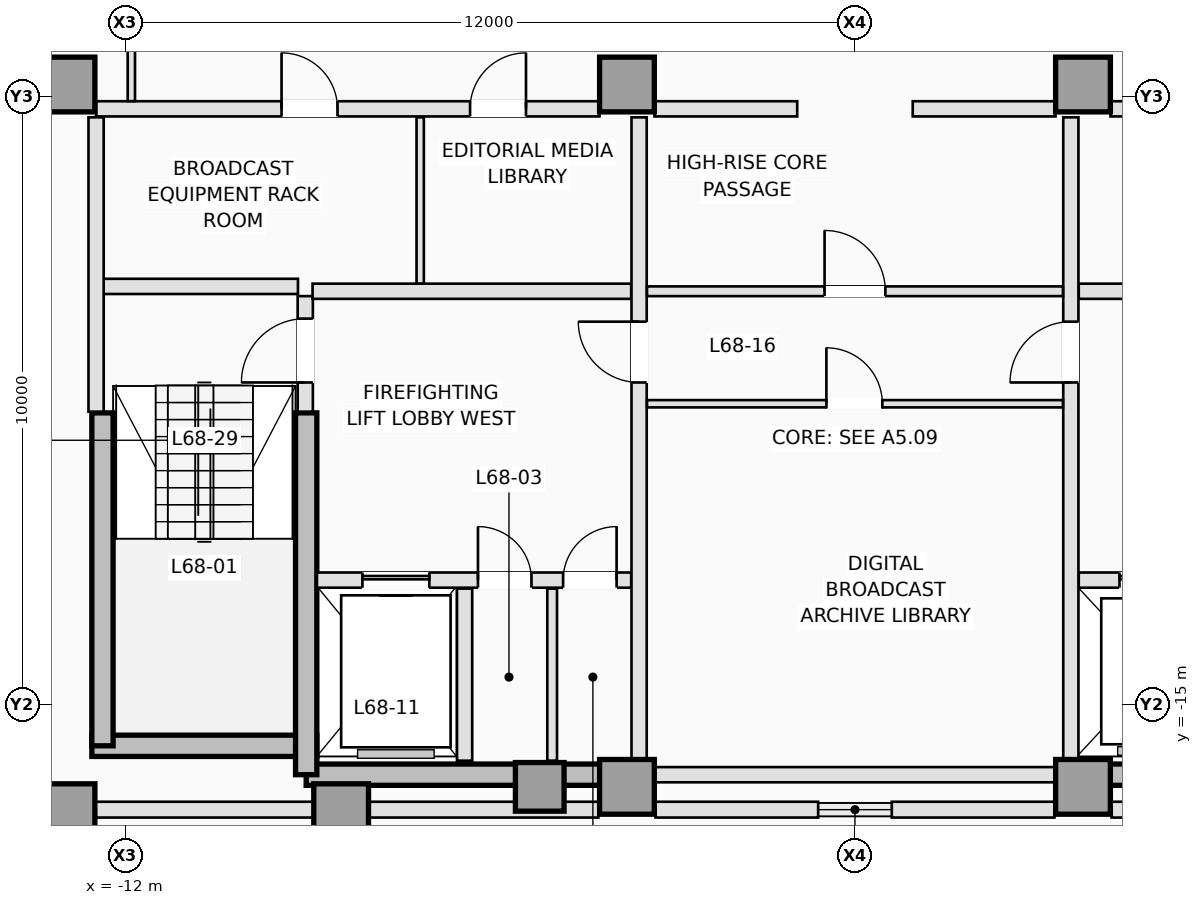
"""IFC4 building model, lengths in metres.
Left out: names, types, materials, properties, quantities, classifications, styles, units other than length and angle.
Written with IfcOpenShell. Run it as: python <this file> out.ifc"""

import sys

from ifc_helpers import new_model, si_unit, direction, frame, frame_2d, origin, origin_2d, place, context, subcontext, project, spatial, rectangle, extrude, element, fill, save


model = new_model("IFC4")
c1 = context("Model", 3, precision=1e-05, world=origin(), true_north=direction((0.0, 1.0)))
c2 = subcontext(c1, "Body", "Model", "MODEL_VIEW")
j1 = project(units=[si_unit("LENGTHUNIT", "METRE"), si_unit("PLANEANGLEUNIT", "RADIAN")], contexts=[c1])
p1 = place(None, origin())
s1 = spatial("IfcSite", under=j1, at=p1, CompositionType="ELEMENT")
p2 = place(p1, origin())
s2 = spatial("IfcBuilding", under=s1, at=p2, CompositionType="ELEMENT")
p3 = place(p2, frame((0.0, 0.0, 246.4)))
s3 = spatial("IfcBuildingStorey", under=s2, at=p3, CompositionType="ELEMENT", Elevation=246.4)
p4 = place(p3, frame((-12.55, -15.675, 0.0), z_axis=(0.0, 0.0, 1.0), x_axis=(1.0, 0.0, 0.0)))
e1 = element("IfcWall", 1, at=p4, inside=s3, PredefinedType="SHEAR", context=c2, shape_type="SweptSolid", body=[
    extrude(rectangle(XDim=3.7, YDim=0.35, at=frame_2d((1.85, 0.0))), origin(), (0.0, 0.0, 1.0), 3.5),
])
for number, where, z_axis, x_axis in (
    (2, (-9.025, -16.15, 0.0), (0.0, 0.0, 1.0), (1.0, 0.0, 0.0)),
    (3, (3.75, -16.15, 0.0), (0.0, 0.0, 1.0), (1.0, 0.0, 0.0)),
):
    element("IfcWall", number, at=place(p3, frame(where, z_axis=z_axis, x_axis=x_axis)), inside=s3, PredefinedType="SHEAR", context=c2, shape_type="SweptSolid", body=[
        extrude(rectangle(XDim=5.275, YDim=0.35, at=frame_2d((2.637, 0.0))), origin(), (0.0, 0.0, 1.0), 3.5),
    ])
p5 = place(p3, frame((-12.375, -15.675, 0.0), z_axis=(0.0, 0.0, 1.0), x_axis=(0.0, 1.0, 0.0)))
e4 = element("IfcWall", 4, at=p5, inside=s3, PredefinedType="SHEAR", context=c2, shape_type="SweptSolid", body=[
    extrude(rectangle(XDim=5.475, YDim=0.35, at=frame_2d((2.738, 0.0))), origin(), (0.0, 0.0, 1.0), 3.5),
])
p6 = place(p3, frame((-9.025, -16.15, 0.0), z_axis=(0.0, 0.0, 1.0), x_axis=(0.0, 1.0, 0.0)))
e5 = element("IfcWall", 5, at=p6, inside=s3, PredefinedType="SHEAR", context=c2, shape_type="SweptSolid", body=[
    extrude(rectangle(XDim=5.95, YDim=0.35, at=frame_2d((2.975, 0.0))), origin(), (0.0, 0.0, 1.0), 3.5),
])
for number, where, z_axis, x_axis in (
    (6, (-12.95, -16.75, 0.0), (0.0, 0.0, 1.0), (1.0, 0.0, 0.0)),
    (7, (-8.45, -16.75, 0.0), (0.0, 0.0, 1.0), (1.0, 0.0, 0.0)),
    (8, (-3.75, -16.35, 0.0), (0.0, 0.0, 1.0), (1.0, 0.0, 0.0)),
    (9, (3.75, -16.35, 0.0), (0.0, 0.0, 1.0), (1.0, 0.0, 0.0)),
    (10, (-12.95, -4.8, 0.0), (0.0, 0.0, 1.0), (1.0, 0.0, 0.0)),
    (11, (-3.75, -4.8, 0.0), (0.0, 0.0, 1.0), (1.0, 0.0, 0.0)),
    (12, (3.75, -4.8, 0.0), (0.0, 0.0, 1.0), (1.0, 0.0, 0.0)),
):
    element("IfcColumn", number, at=place(p3, frame(where, z_axis=z_axis, x_axis=x_axis)), inside=s3, PredefinedType="COLUMN", context=c2, shape_type="SweptSolid", body=[
        extrude(rectangle(XDim=0.9, YDim=0.9, at=origin_2d()), origin(), (0.0, 0.0, 1.0), 3.5),
    ])
p7 = place(p3, frame((-5.184, -16.35, 0.0), z_axis=(0.0, 0.0, 1.0), x_axis=(0.0, 1.0, 0.0)))
e13 = element("IfcColumn", 13, at=p7, inside=s3, PredefinedType="COLUMN", context=c2, shape_type="SweptSolid", body=[
    extrude(rectangle(XDim=0.8, YDim=0.8, at=origin_2d()), origin(), (0.0, 0.0, 1.0), 3.5),
])
for number, where, z_axis, x_axis in (
    (14, (15.493, -16.725, 0.0), (0.0, 0.0, 1.0), (-1.0, 0.0, 0.0)),
    (15, (-4.22, -16.725, 0.0), (0.0, 0.0, 1.0), (-1.0, 0.0, 0.0)),
):
    element("IfcWall", number, at=place(p3, frame(where, z_axis=z_axis, x_axis=x_axis)), inside=s3, PredefinedType="STANDARD", context=c2, shape_type="SweptSolid", body=[
        extrude(rectangle(XDim=11.273, YDim=0.26, at=frame_2d((5.636, 0.0))), origin(), (0.0, 0.0, 1.0), 2.79),
    ])
for number, where, z_axis, x_axis in (
    (16, (3.28, -16.725, 0.0), (0.0, 0.0, 1.0), (-1.0, 0.0, 0.0)),
    (17, (-0.606, -16.725, 0.0), (0.0, 0.0, 1.0), (-1.0, 0.0, 0.0)),
):
    element("IfcWall", number, at=place(p3, frame(where, z_axis=z_axis, x_axis=x_axis)), inside=s3, PredefinedType="STANDARD", context=c2, shape_type="SweptSolid", body=[
        extrude(rectangle(XDim=2.674, YDim=0.26, at=frame_2d((1.337, 0.0))), origin(), (0.0, 0.0, 1.0), 3.25),
    ])
p8 = place(p3, frame((-9.04, -10.18, 0.0), z_axis=(0.0, 0.0, 1.0), x_axis=(0.0, 1.0, 0.0)))
e18 = element("IfcWall", 18, at=p8, inside=s3, PredefinedType="PARTITIONING", context=c2, shape_type="SweptSolid", body=[
    extrude(rectangle(XDim=1.9, YDim=0.25, at=frame_2d((0.95, 0.0))), origin(), (0.0, 0.0, 1.0), 3.25),
])
p9 = place(p8, frame((0.48, 0.0, 0.0)))
e19 = element("IfcOpeningElement", 19, at=p9, cuts=e18, PredefinedType="OPENING", context=c2, shape_type="SweptSolid", body=[
    extrude(rectangle(XDim=1.05, YDim=2.15, at=frame_2d((0.525, 1.075))), frame((0.0, 0.135, 0.0), z_axis=(0.0, -1.0, 0.0), x_axis=(1.0, 0.0, 0.0)), (0.0, 0.0, 1.0), 0.27),
])
p10 = place(p3, frame((-12.38, -8.12, 0.0), z_axis=(0.0, 0.0, 1.0), x_axis=(1.0, 0.0, 0.0)))
e20 = element("IfcWall", 20, at=p10, inside=s3, PredefinedType="PARTITIONING", context=c2, shape_type="SweptSolid", body=[
    extrude(rectangle(XDim=3.22, YDim=0.25, at=frame_2d((1.61, 0.0))), origin(), (0.0, 0.0, 1.0), 3.25),
])
p11 = place(p3, frame((-12.48, -10.18, 0.0), z_axis=(0.0, 0.0, 1.0), x_axis=(0.0, 1.0, 0.0)))
e21 = element("IfcWall", 21, at=p11, inside=s3, PredefinedType="PARTITIONING", context=c2, shape_type="SweptSolid", body=[
    extrude(rectangle(XDim=4.84, YDim=0.25, at=frame_2d((2.42, 0.0))), origin(), (0.0, 0.0, 1.0), 3.25),
])
p12 = place(p3, frame((-8.848, -12.95, 0.0), z_axis=(0.0, 0.0, 1.0), x_axis=(1.0, 0.0, 0.0)))
e22 = element("IfcWall", 22, at=p12, inside=s3, PredefinedType="PARTITIONING", context=c2, shape_type="SweptSolid", body=[
    extrude(rectangle(XDim=5.168, YDim=0.25, at=frame_2d((2.584, 0.0))), origin(), (0.0, 0.0, 1.0), 3.25),
])
p13 = place(p12, frame((0.748, 0.0, 0.0)))
e23 = element("IfcOpeningElement", 23, at=p13, cuts=e22, PredefinedType="OPENING", context=c2, shape_type="SweptSolid", body=[
    extrude(rectangle(XDim=1.1, YDim=2.15, at=frame_2d((0.55, 1.075))), frame((0.0, 0.135, 0.0), z_axis=(0.0, -1.0, 0.0), x_axis=(1.0, 0.0, 0.0)), (0.0, 0.0, 1.0), 0.27),
])
p14 = place(p12, frame((2.648, 0.0, 0.0)))
e24 = element("IfcOpeningElement", 24, at=p14, cuts=e22, PredefinedType="OPENING", context=c2, shape_type="SweptSolid", body=[
    extrude(rectangle(XDim=0.88, YDim=2.1, at=frame_2d((0.44, 1.05))), frame((0.0, 0.135, 0.0), z_axis=(0.0, -1.0, 0.0), x_axis=(1.0, 0.0, 0.0)), (0.0, 0.0, 1.0), 0.27),
])
p15 = place(p12, frame((4.048, 0.0, 0.0)))
e25 = element("IfcOpeningElement", 25, at=p15, cuts=e22, PredefinedType="OPENING", context=c2, shape_type="SweptSolid", body=[
    extrude(rectangle(XDim=0.88, YDim=2.1, at=frame_2d((0.44, 1.05))), frame((0.0, 0.135, 0.0), z_axis=(0.0, -1.0, 0.0), x_axis=(1.0, 0.0, 0.0)), (0.0, 0.0, 1.0), 0.27),
])
p16 = place(p3, frame((3.68, -12.95, 0.0), z_axis=(0.0, 0.0, 1.0), x_axis=(1.0, 0.0, 0.0)))
e26 = element("IfcWall", 26, at=p16, inside=s3, PredefinedType="PARTITIONING", context=c2, shape_type="SweptSolid", body=[
    extrude(rectangle(XDim=5.168, YDim=0.25, at=frame_2d((2.584, 0.0))), origin(), (0.0, 0.0, 1.0), 3.25),
])
p17 = place(p16, frame((3.32, 0.0, 0.0)))
e27 = element("IfcOpeningElement", 27, at=p17, cuts=e26, PredefinedType="OPENING", context=c2, shape_type="SweptSolid", body=[
    extrude(rectangle(XDim=1.1, YDim=2.15, at=frame_2d((0.55, 1.075))), frame((0.0, 0.135, 0.0), z_axis=(0.0, -1.0, 0.0), x_axis=(1.0, 0.0, 0.0)), (0.0, 0.0, 1.0), 0.27),
])
p18 = place(p16, frame((0.67, 0.0, 0.0)))
e28 = element("IfcOpeningElement", 28, at=p18, cuts=e26, PredefinedType="OPENING", context=c2, shape_type="SweptSolid", body=[
    extrude(rectangle(XDim=1.2, YDim=2.15, at=frame_2d((0.6, 1.075))), frame((0.0, 0.135, 0.0), z_axis=(0.0, -1.0, 0.0), x_axis=(1.0, 0.0, 0.0)), (0.0, 0.0, 1.0), 0.27),
])
p19 = place(p3, frame((-6.42, -15.92, 0.0), z_axis=(0.0, 0.0, 1.0), x_axis=(0.0, 1.0, 0.0)))
e29 = element("IfcWall", 29, at=p19, inside=s3, PredefinedType="PARTITIONING", context=c2, shape_type="SweptSolid", body=[
    extrude(rectangle(XDim=2.83, YDim=0.25, at=frame_2d((1.415, 0.0))), origin(), (0.0, 0.0, 1.0), 3.25),
])
p20 = place(p3, frame((-4.98, -15.92, 0.0), z_axis=(0.0, 0.0, 1.0), x_axis=(0.0, 1.0, 0.0)))
e30 = element("IfcWall", 30, at=p20, inside=s3, PredefinedType="PARTITIONING", context=c2, shape_type="SweptSolid", body=[
    extrude(rectangle(XDim=2.83, YDim=0.16, at=frame_2d((1.415, 0.0))), origin(), (0.0, 0.0, 1.0), 3.25),
])
for number, where, z_axis, x_axis in (
    (31, (-8.92, -8.2, 0.0), (0.0, 0.0, 1.0), (1.0, 0.0, 0.0)),
    (32, (3.68, -8.2, 0.0), (0.0, 0.0, 1.0), (1.0, 0.0, 0.0)),
):
    element("IfcWall", number, at=place(p3, frame(where, z_axis=z_axis, x_axis=x_axis)), inside=s3, PredefinedType="PARTITIONING", context=c2, shape_type="SweptSolid", body=[
        extrude(rectangle(XDim=5.24, YDim=0.25, at=frame_2d((2.62, 0.0))), origin(), (0.0, 0.0, 1.0), 3.25),
    ])
p21 = place(p3, frame((-3.55, -15.898, 0.0), z_axis=(0.0, 0.0, 1.0), x_axis=(0.0, 1.0, 0.0)))
e33 = element("IfcWall", 33, at=p21, inside=s3, PredefinedType="PARTITIONING", context=c2, shape_type="SweptSolid", body=[
    extrude(rectangle(XDim=10.558, YDim=0.25, at=frame_2d((5.279, 0.0))), origin(), (0.0, 0.0, 1.0), 3.25),
])
p22 = place(p21, frame((6.198, 0.0, 0.0)))
e34 = element("IfcOpeningElement", 34, at=p22, cuts=e33, PredefinedType="OPENING", context=c2, shape_type="SweptSolid", body=[
    extrude(rectangle(XDim=1.0, YDim=2.15, at=frame_2d((0.5, 1.075))), frame((0.0, 0.135, 0.0), z_axis=(0.0, -1.0, 0.0), x_axis=(1.0, 0.0, 0.0)), (0.0, 0.0, 1.0), 0.27),
])
p23 = place(p3, frame((3.55, -15.898, 0.0), z_axis=(0.0, 0.0, 1.0), x_axis=(0.0, 1.0, 0.0)))
e35 = element("IfcWall", 35, at=p23, inside=s3, PredefinedType="PARTITIONING", context=c2, shape_type="SweptSolid", body=[
    extrude(rectangle(XDim=10.558, YDim=0.25, at=frame_2d((5.279, 0.0))), origin(), (0.0, 0.0, 1.0), 3.25),
])
p24 = place(p23, frame((6.198, 0.0, 0.0)))
e36 = element("IfcOpeningElement", 36, at=p24, cuts=e35, PredefinedType="OPENING", context=c2, shape_type="SweptSolid", body=[
    extrude(rectangle(XDim=1.0, YDim=2.15, at=frame_2d((0.5, 1.075))), frame((0.0, 0.135, 0.0), z_axis=(0.0, -1.0, 0.0), x_axis=(1.0, 0.0, 0.0)), (0.0, 0.0, 1.0), 0.27),
])
p25 = place(p3, frame((-12.48, -5.2, 0.0), z_axis=(0.0, 0.0, 1.0), x_axis=(1.0, 0.0, 0.0)))
e37 = element("IfcWall", 37, at=p25, inside=s3, PredefinedType="PARTITIONING", context=c2, shape_type="SweptSolid", body=[
    extrude(rectangle(XDim=8.278, YDim=0.25, at=frame_2d((4.139, 0.0))), origin(), (0.0, 0.0, 1.0), 3.25),
])
p26 = place(p25, frame((3.05, 0.0, 0.0)))
e38 = element("IfcOpeningElement", 38, at=p26, cuts=e37, PredefinedType="OPENING", context=c2, shape_type="SweptSolid", body=[
    extrude(rectangle(XDim=0.92, YDim=2.12, at=frame_2d((0.46, 1.06))), frame((0.0, 0.135, 0.0), z_axis=(0.0, -1.0, 0.0), x_axis=(1.0, 0.0, 0.0)), (0.0, 0.0, 1.0), 0.27),
])
p27 = place(p25, frame((6.15, 0.0, 0.0)))
e39 = element("IfcOpeningElement", 39, at=p27, cuts=e37, PredefinedType="OPENING", context=c2, shape_type="SweptSolid", body=[
    extrude(rectangle(XDim=0.92, YDim=2.12, at=frame_2d((0.46, 1.06))), frame((0.0, 0.135, 0.0), z_axis=(0.0, -1.0, 0.0), x_axis=(1.0, 0.0, 0.0)), (0.0, 0.0, 1.0), 0.27),
])
p28 = place(p3, frame((4.202, -5.2, 0.0), z_axis=(0.0, 0.0, 1.0), x_axis=(1.0, 0.0, 0.0)))
e40 = element("IfcWall", 40, at=p28, inside=s3, PredefinedType="PARTITIONING", context=c2, shape_type="SweptSolid", body=[
    extrude(rectangle(XDim=8.278, YDim=0.25, at=frame_2d((4.139, 0.0))), origin(), (0.0, 0.0, 1.0), 3.25),
])
p29 = place(p28, frame((0.748, 0.0, 0.0)))
e41 = element("IfcOpeningElement", 41, at=p29, cuts=e40, PredefinedType="OPENING", context=c2, shape_type="SweptSolid", body=[
    extrude(rectangle(XDim=1.0, YDim=2.15, at=frame_2d((0.5, 1.075))), frame((0.0, 0.135, 0.0), z_axis=(0.0, -1.0, 0.0), x_axis=(1.0, 0.0, 0.0)), (0.0, 0.0, 1.0), 0.27),
])
p30 = place(p28, frame((2.698, 0.0, 0.0)))
e42 = element("IfcOpeningElement", 42, at=p30, cuts=e40, PredefinedType="OPENING", context=c2, shape_type="SweptSolid", body=[
    extrude(rectangle(XDim=1.0, YDim=2.15, at=frame_2d((0.5, 1.075))), frame((0.0, 0.135, 0.0), z_axis=(0.0, -1.0, 0.0), x_axis=(1.0, 0.0, 0.0)), (0.0, 0.0, 1.0), 0.27),
])
p31 = place(p28, frame((4.648, 0.0, 0.0)))
e43 = element("IfcOpeningElement", 43, at=p31, cuts=e40, PredefinedType="OPENING", context=c2, shape_type="SweptSolid", body=[
    extrude(rectangle(XDim=1.0, YDim=2.15, at=frame_2d((0.5, 1.075))), frame((0.0, 0.135, 0.0), z_axis=(0.0, -1.0, 0.0), x_axis=(1.0, 0.0, 0.0)), (0.0, 0.0, 1.0), 0.27),
])
p32 = place(p28, frame((6.598, 0.0, 0.0)))
e44 = element("IfcOpeningElement", 44, at=p32, cuts=e40, PredefinedType="OPENING", context=c2, shape_type="SweptSolid", body=[
    extrude(rectangle(XDim=1.0, YDim=2.15, at=frame_2d((0.5, 1.075))), frame((0.0, 0.135, 0.0), z_axis=(0.0, -1.0, 0.0), x_axis=(1.0, 0.0, 0.0)), (0.0, 0.0, 1.0), 0.27),
])
for number, where, z_axis, x_axis in (
    (45, (-3.298, -5.2, 0.0), (0.0, 0.0, 1.0), (1.0, 0.0, 0.0)),
    (46, (0.95, -5.2, 0.0), (0.0, 0.0, 1.0), (1.0, 0.0, 0.0)),
):
    element("IfcWall", number, at=place(p3, frame(where, z_axis=z_axis, x_axis=x_axis)), inside=s3, PredefinedType="PARTITIONING", context=c2, shape_type="SweptSolid", body=[
        extrude(rectangle(XDim=2.348, YDim=0.25, at=frame_2d((1.174, 0.0))), origin(), (0.0, 0.0, 1.0), 3.25),
    ])
p33 = place(p3, frame((-7.15, -8.073, 0.0), z_axis=(0.0, 0.0, 1.0), x_axis=(0.0, 1.0, 0.0)))
e47 = element("IfcWall", 47, at=p33, inside=s3, PredefinedType="PARTITIONING", context=c2, shape_type="SweptSolid", body=[
    extrude(rectangle(XDim=2.733, YDim=0.12, at=frame_2d((1.366, 0.0))), origin(), (0.0, 0.0, 1.0), 3.25),
])
p34 = place(p3, frame((-3.298, -16.15, 0.0), z_axis=(0.0, 0.0, 1.0), x_axis=(1.0, 0.0, 0.0)))
e48 = element("IfcWall", 48, at=p34, inside=s3, PredefinedType="PARTITIONING", context=c2, shape_type="SweptSolid", body=[
    extrude(rectangle(XDim=6.596, YDim=0.25, at=frame_2d((3.298, 0.0))), origin(), (0.0, 0.0, 1.0), 2.844),
])
p35 = place(p3, frame((-3.42, -8.2, 0.0), z_axis=(0.0, 0.0, 1.0), x_axis=(1.0, 0.0, 0.0)))
e49 = element("IfcWall", 49, at=p35, inside=s3, PredefinedType="PARTITIONING", context=c2, shape_type="SweptSolid", body=[
    extrude(rectangle(XDim=6.84, YDim=0.16, at=frame_2d((3.42, 0.0))), origin(), (0.0, 0.0, 1.0), 3.25),
])
p36 = place(p35, frame((2.92, 0.0, 0.0)))
e50 = element("IfcOpeningElement", 50, at=p36, cuts=e49, PredefinedType="OPENING", context=c2, shape_type="SweptSolid", body=[
    extrude(rectangle(XDim=1.0, YDim=2.15, at=frame_2d((0.5, 1.075))), frame((0.0, 0.09, 0.0), z_axis=(0.0, -1.0, 0.0), x_axis=(1.0, 0.0, 0.0)), (0.0, 0.0, 1.0), 0.18),
])
p37 = place(p3, frame((-3.42, -10.05, 0.0), z_axis=(0.0, 0.0, 1.0), x_axis=(1.0, 0.0, 0.0)))
e51 = element("IfcWall", 51, at=p37, inside=s3, PredefinedType="PARTITIONING", context=c2, shape_type="SweptSolid", body=[
    extrude(rectangle(XDim=6.84, YDim=0.12, at=frame_2d((3.42, 0.0))), origin(), (0.0, 0.0, 1.0), 3.25),
])
p38 = place(p37, frame((2.95, 0.0, 0.0)))
e52 = element("IfcOpeningElement", 52, at=p38, cuts=e51, PredefinedType="OPENING", context=c2, shape_type="SweptSolid", body=[
    extrude(rectangle(XDim=0.92, YDim=2.12, at=frame_2d((0.46, 1.06))), frame((0.0, 0.07, 0.0), z_axis=(0.0, -1.0, 0.0), x_axis=(1.0, 0.0, 0.0)), (0.0, 0.0, 1.0), 0.14),
])
p39 = place(p3, frame((-11.9, -5.073, 0.0), z_axis=(0.0, 0.0, 1.0), x_axis=(0.0, 1.0, 0.0)))
e53 = element("IfcWall", 53, at=p39, inside=s3, PredefinedType="PARTITIONING", context=c2, shape_type="SweptSolid", body=[
    extrude(rectangle(XDim=2.343, YDim=0.12, at=frame_2d((1.171, 0.0))), origin(), (0.0, 0.0, 1.0), 3.25),
])
p40 = place(p13, origin())
e54 = element("IfcDoor", 54, at=p40, inside=s3, OperationType="SLIDING_TO_LEFT", PredefinedType="DOOR", context=c2, shape_type="SweptSolid", body=[
    extrude(rectangle(XDim=1.1, YDim=2.15, at=frame_2d((0.55, 1.075))), frame((0.0, 0.025, 0.0), z_axis=(0.0, -1.0, 0.0), x_axis=(1.0, 0.0, 0.0)), (0.0, 0.0, 1.0), 0.05),
])
fill(e23, e54)
p41 = place(p18, origin())
e55 = element("IfcDoor", 55, at=p41, inside=s3, OperationType="SLIDING_TO_LEFT", PredefinedType="DOOR", context=c2, shape_type="SweptSolid", body=[
    extrude(rectangle(XDim=1.2, YDim=2.15, at=frame_2d((0.6, 1.075))), frame((0.0, 0.025, 0.0), z_axis=(0.0, -1.0, 0.0), x_axis=(1.0, 0.0, 0.0)), (0.0, 0.0, 1.0), 0.05),
])
fill(e28, e55)
p42 = place(p9, origin())
e56 = element("IfcDoor", 56, at=p42, inside=s3, OperationType="SINGLE_SWING_LEFT", PredefinedType="DOOR", context=c2, shape_type="SweptSolid", body=[
    extrude(rectangle(XDim=1.05, YDim=2.15, at=frame_2d((0.525, 1.075))), frame((0.0, 0.025, 0.0), z_axis=(0.0, -1.0, 0.0), x_axis=(1.0, 0.0, 0.0)), (0.0, 0.0, 1.0), 0.05),
])
fill(e19, e56)
p43 = place(p14, origin())
e57 = element("IfcDoor", 57, at=p43, inside=s3, OperationType="SINGLE_SWING_LEFT", PredefinedType="TRAPDOOR", context=c2, shape_type="SweptSolid", body=[
    extrude(rectangle(XDim=0.88, YDim=2.1, at=frame_2d((0.44, 1.05))), frame((0.0, 0.025, 0.0), z_axis=(0.0, -1.0, 0.0), x_axis=(1.0, 0.0, 0.0)), (0.0, 0.0, 1.0), 0.05),
])
fill(e24, e57)
p44 = place(p15, origin())
e58 = element("IfcDoor", 58, at=p44, inside=s3, OperationType="SINGLE_SWING_RIGHT", PredefinedType="TRAPDOOR", context=c2, shape_type="SweptSolid", body=[
    extrude(rectangle(XDim=0.88, YDim=2.1, at=frame_2d((0.44, 1.05))), frame((0.0, 0.025, 0.0), z_axis=(0.0, -1.0, 0.0), x_axis=(1.0, 0.0, 0.0)), (0.0, 0.0, 1.0), 0.05),
])
fill(e25, e58)
p45 = place(p22, origin())
e59 = element("IfcDoor", 59, at=p45, inside=s3, OperationType="SINGLE_SWING_RIGHT", PredefinedType="DOOR", context=c2, shape_type="SweptSolid", body=[
    extrude(rectangle(XDim=1.0, YDim=2.15, at=frame_2d((0.5, 1.075))), frame((0.0, 0.025, 0.0), z_axis=(0.0, -1.0, 0.0), x_axis=(1.0, 0.0, 0.0)), (0.0, 0.0, 1.0), 0.05),
])
fill(e34, e59)
p46 = place(p24, origin())
e60 = element("IfcDoor", 60, at=p46, inside=s3, OperationType="SINGLE_SWING_LEFT", PredefinedType="DOOR", context=c2, shape_type="SweptSolid", body=[
    extrude(rectangle(XDim=1.0, YDim=2.15, at=frame_2d((0.5, 1.075))), frame((0.0, 0.025, 0.0), z_axis=(0.0, -1.0, 0.0), x_axis=(1.0, 0.0, 0.0)), (0.0, 0.0, 1.0), 0.05),
])
fill(e36, e60)
p47 = place(p26, origin())
e61 = element("IfcDoor", 61, at=p47, inside=s3, OperationType="SINGLE_SWING_LEFT", PredefinedType="DOOR", context=c2, shape_type="SweptSolid", body=[
    extrude(rectangle(XDim=0.92, YDim=2.12, at=frame_2d((0.46, 1.06))), frame((0.0, 0.025, 0.0), z_axis=(0.0, -1.0, 0.0), x_axis=(1.0, 0.0, 0.0)), (0.0, 0.0, 1.0), 0.05),
])
fill(e38, e61)
p48 = place(p27, origin())
e62 = element("IfcDoor", 62, at=p48, inside=s3, OperationType="SINGLE_SWING_RIGHT", PredefinedType="DOOR", context=c2, shape_type="SweptSolid", body=[
    extrude(rectangle(XDim=0.92, YDim=2.12, at=frame_2d((0.46, 1.06))), frame((0.0, 0.025, 0.0), z_axis=(0.0, -1.0, 0.0), x_axis=(1.0, 0.0, 0.0)), (0.0, 0.0, 1.0), 0.05),
])
fill(e39, e62)
p49 = place(p36, origin())
e63 = element("IfcDoor", 63, at=p49, inside=s3, OperationType="SINGLE_SWING_LEFT", PredefinedType="DOOR", context=c2, shape_type="SweptSolid", body=[
    extrude(rectangle(XDim=1.0, YDim=2.15, at=frame_2d((0.5, 1.075))), frame((0.0, 0.025, 0.0), z_axis=(0.0, -1.0, 0.0), x_axis=(1.0, 0.0, 0.0)), (0.0, 0.0, 1.0), 0.05),
])
fill(e50, e63)
p50 = place(p38, origin())
e64 = element("IfcDoor", 64, at=p50, inside=s3, OperationType="SINGLE_SWING_LEFT", PredefinedType="DOOR", context=c2, shape_type="SweptSolid", body=[
    extrude(rectangle(XDim=0.92, YDim=2.12, at=frame_2d((0.46, 1.06))), frame((0.0, 0.025, 0.0), z_axis=(0.0, -1.0, 0.0), x_axis=(1.0, 0.0, 0.0)), (0.0, 0.0, 1.0), 0.05),
])
fill(e52, e64)
save(model, sys.argv[1])
